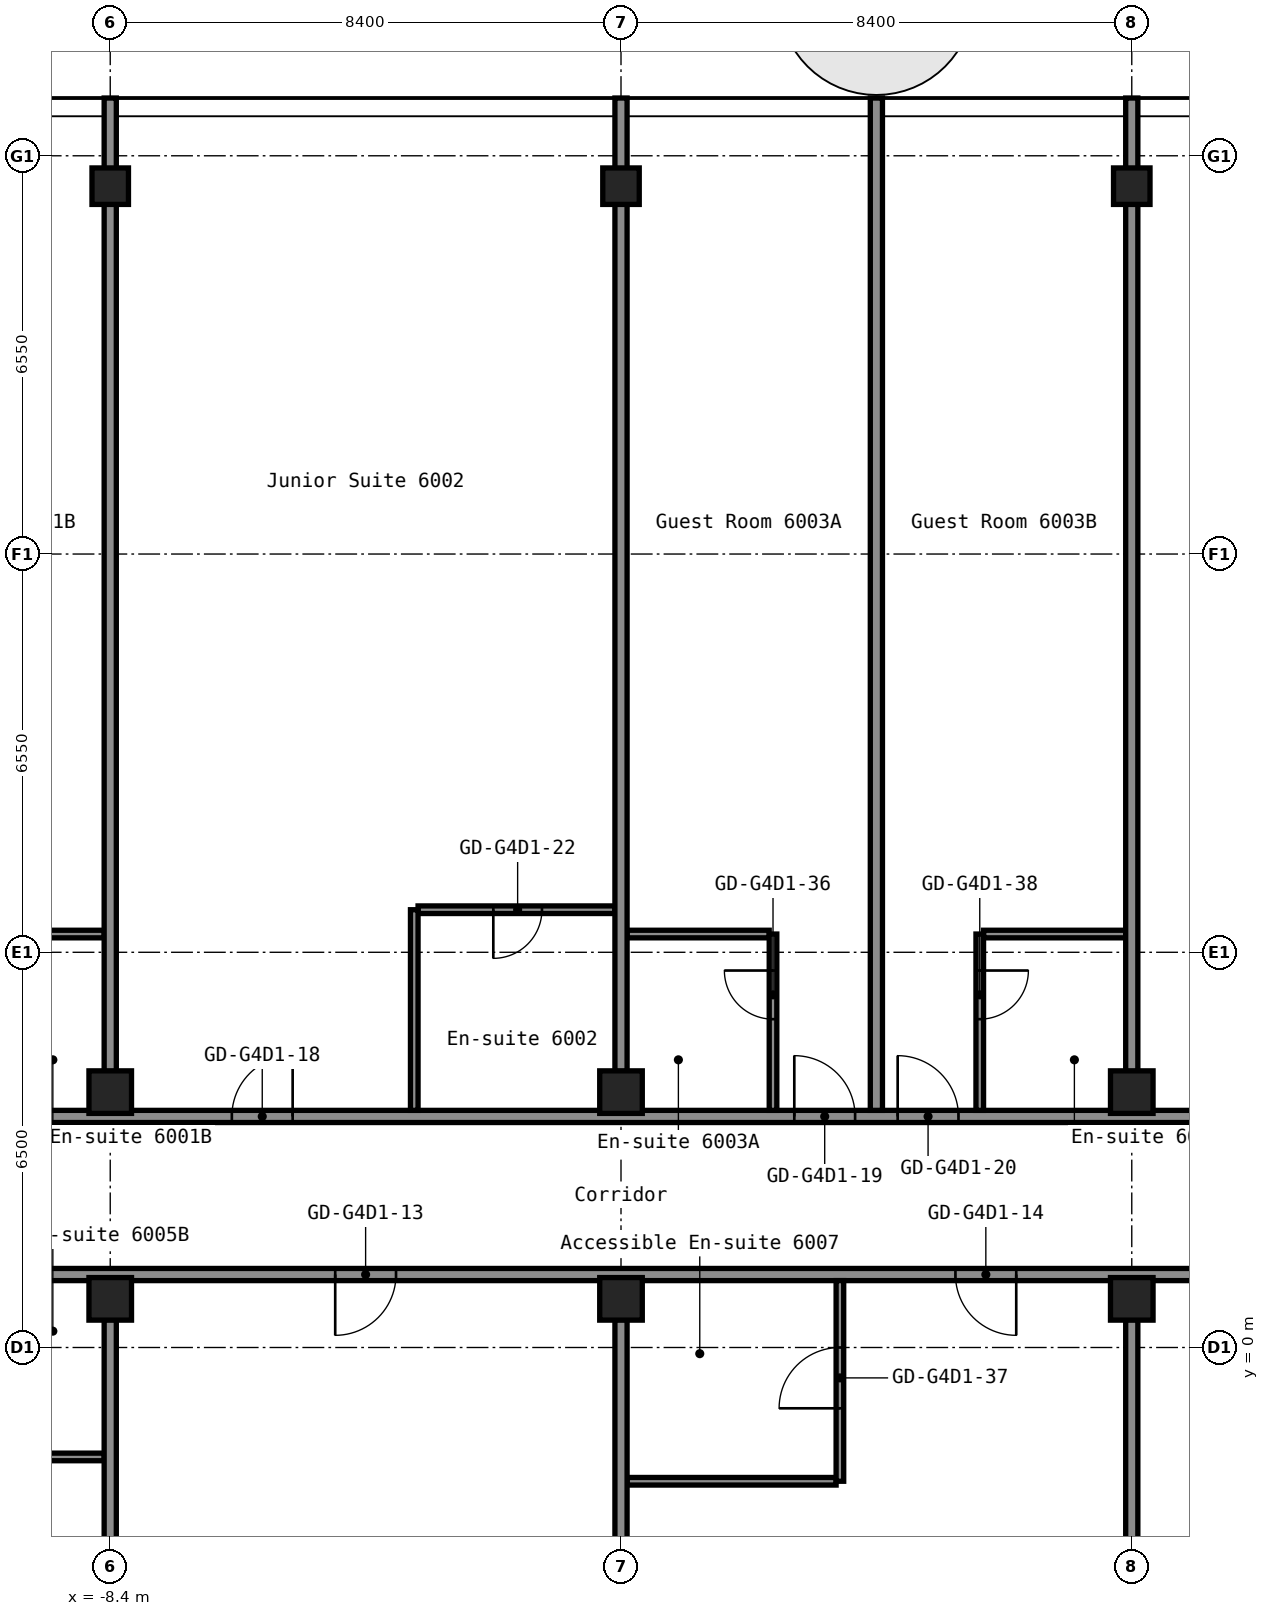
"""IFC4 building model, lengths in metres.
Left out: names, types, materials, properties, quantities, classifications, styles, units other than length and angle.
Written with IfcOpenShell. Run it as: python <this file> out.ifc"""

import sys

from ifc_helpers import new_model, si_unit, direction, frame, frame_2d, origin, origin_2d, place, context, subcontext, project, spatial, rectangle, hollow_rectangle, extrude, element, fill, save


model = new_model("IFC4")
c1 = context("Model", 3, precision=1e-05, world=origin(), true_north=direction((0.0, 1.0)))
c2 = subcontext(c1, "Body", "Model", "MODEL_VIEW")
j1 = project(units=[si_unit("LENGTHUNIT", "METRE"), si_unit("PLANEANGLEUNIT", "RADIAN")], contexts=[c1])
p1 = place(None, origin())
s1 = spatial("IfcSite", under=j1, at=p1, CompositionType="ELEMENT")
p2 = place(p1, origin())
s2 = spatial("IfcBuilding", under=s1, at=p2, CompositionType="ELEMENT")
p3 = place(p2, frame((0.0, 0.0, 212.2)))
s3 = spatial("IfcBuildingStorey", under=s2, at=p3, CompositionType="ELEMENT", Elevation=212.2)
for number, where, z_axis, x_axis in (
    (1, (-8.4, 0.8, 0.0), (0.0, 0.0, 1.0), (1.0, 0.0, 0.0)),
    (2, (-8.4, 4.2, 0.0), (0.0, 0.0, 1.0), (1.0, 0.0, 0.0)),
):
    element("IfcColumn", number, at=place(p3, frame(where, z_axis=z_axis, x_axis=x_axis)), inside=s3, PredefinedType="COLUMN", context=c2, shape_type="SweptSolid", body=[
        extrude(hollow_rectangle(XDim=0.7, YDim=0.7, WallThickness=0.028, at=origin_2d()), origin(), (0.0, 0.0, 1.0), 2.75),
    ])
p4 = place(p3, frame((-8.4, 19.1, 0.0), z_axis=(0.0, 0.0, 1.0), x_axis=(1.0, 0.0, 0.0)))
e3 = element("IfcColumn", 3, at=p4, inside=s3, PredefinedType="COLUMN", context=c2, shape_type="SweptSolid", body=[
    extrude(hollow_rectangle(XDim=0.6, YDim=0.6, WallThickness=0.025, InnerFilletRadius=0.038, OuterFilletRadius=0.062, at=origin_2d()), origin(), (0.0, 0.0, 1.0), 2.75),
])
for number, where, z_axis, x_axis in (
    (4, (0.0, 0.8, 0.0), (0.0, 0.0, 1.0), (1.0, 0.0, 0.0)),
    (5, (0.0, 4.2, 0.0), (0.0, 0.0, 1.0), (1.0, 0.0, 0.0)),
):
    element("IfcColumn", number, at=place(p3, frame(where, z_axis=z_axis, x_axis=x_axis)), inside=s3, PredefinedType="COLUMN", context=c2, shape_type="SweptSolid", body=[
        extrude(hollow_rectangle(XDim=0.7, YDim=0.7, WallThickness=0.028, at=origin_2d()), origin(), (0.0, 0.0, 1.0), 2.75),
    ])
p5 = place(p3, frame((0.0, 19.1, 0.0), z_axis=(0.0, 0.0, 1.0), x_axis=(1.0, 0.0, 0.0)))
e6 = element("IfcColumn", 6, at=p5, inside=s3, PredefinedType="COLUMN", context=c2, shape_type="SweptSolid", body=[
    extrude(hollow_rectangle(XDim=0.6, YDim=0.6, WallThickness=0.025, InnerFilletRadius=0.038, OuterFilletRadius=0.062, at=origin_2d()), origin(), (0.0, 0.0, 1.0), 2.75),
])
for number, where, z_axis, x_axis in (
    (7, (8.4, 0.8, 0.0), (0.0, 0.0, 1.0), (1.0, 0.0, 0.0)),
    (8, (8.4, 4.2, 0.0), (0.0, 0.0, 1.0), (1.0, 0.0, 0.0)),
):
    element("IfcColumn", number, at=place(p3, frame(where, z_axis=z_axis, x_axis=x_axis)), inside=s3, PredefinedType="COLUMN", context=c2, shape_type="SweptSolid", body=[
        extrude(hollow_rectangle(XDim=0.7, YDim=0.7, WallThickness=0.028, at=origin_2d()), origin(), (0.0, 0.0, 1.0), 2.75),
    ])
p6 = place(p3, frame((8.4, 19.1, 0.0), z_axis=(0.0, 0.0, 1.0), x_axis=(1.0, 0.0, 0.0)))
e9 = element("IfcColumn", 9, at=p6, inside=s3, PredefinedType="COLUMN", context=c2, shape_type="SweptSolid", body=[
    extrude(hollow_rectangle(XDim=0.6, YDim=0.6, WallThickness=0.025, InnerFilletRadius=0.038, OuterFilletRadius=0.062, at=origin_2d()), origin(), (0.0, 0.0, 1.0), 2.75),
])
p7 = place(p3, frame((0.1, -2.2, 0.0), z_axis=(0.0, 0.0, 1.0), x_axis=(1.0, 0.0, 0.0)))
e10 = element("IfcWall", 10, at=p7, inside=s3, PredefinedType="PARTITIONING", context=c2, shape_type="SweptSolid", body=[
    extrude(rectangle(XDim=3.438, YDim=0.125, at=frame_2d((1.719, 0.0))), origin(), (0.0, 0.0, 1.0), 2.75),
])
p8 = place(p3, frame((-10.837, -1.8, 0.0), z_axis=(0.0, 0.0, 1.0), x_axis=(1.0, 0.0, 0.0)))
e11 = element("IfcWall", 11, at=p8, inside=s3, PredefinedType="PARTITIONING", context=c2, shape_type="SweptSolid", body=[
    extrude(rectangle(XDim=2.337, YDim=0.125, at=frame_2d((1.169, 0.0))), origin(), (0.0, 0.0, 1.0), 2.75),
])
p9 = place(p3, frame((-16.8, 1.2, 0.0), z_axis=(0.0, 0.0, 1.0), x_axis=(1.0, 0.0, 0.0)))
e12 = element("IfcWall", 12, at=p9, inside=s3, PredefinedType="PARTITIONING", context=c2, shape_type="SweptSolid", body=[
    extrude(rectangle(XDim=33.6, YDim=0.2, at=frame_2d((16.8, 0.0))), origin(), (0.0, 0.0, 1.0), 2.75),
])
p10 = place(p9, frame((2.85, 0.0, 0.0)))
e13 = element("IfcOpeningElement", 13, at=p10, cuts=e12, PredefinedType="OPENING", context=c2, shape_type="SweptSolid", body=[
    extrude(rectangle(XDim=1.0, YDim=2.1, at=frame_2d((0.5, 1.05))), frame((0.0, 0.11, 0.0), z_axis=(0.0, -1.0, 0.0), x_axis=(1.0, 0.0, 0.0)), (0.0, 0.0, 1.0), 0.22),
])
p11 = place(p9, frame((4.55, 0.0, 0.0)))
e14 = element("IfcOpeningElement", 14, at=p11, cuts=e12, PredefinedType="OPENING", context=c2, shape_type="SweptSolid", body=[
    extrude(rectangle(XDim=1.0, YDim=2.1, at=frame_2d((0.5, 1.05))), frame((0.0, 0.11, 0.0), z_axis=(0.0, -1.0, 0.0), x_axis=(1.0, 0.0, 0.0)), (0.0, 0.0, 1.0), 0.22),
])
p12 = place(p9, frame((12.1, 0.0, 0.0)))
e15 = element("IfcOpeningElement", 15, at=p12, cuts=e12, PredefinedType="OPENING", context=c2, shape_type="SweptSolid", body=[
    extrude(rectangle(XDim=1.0, YDim=2.1, at=frame_2d((0.5, 1.05))), frame((0.0, 0.11, 0.0), z_axis=(0.0, -1.0, 0.0), x_axis=(1.0, 0.0, 0.0)), (0.0, 0.0, 1.0), 0.22),
])
p13 = place(p9, frame((22.3, 0.0, 0.0)))
e16 = element("IfcOpeningElement", 16, at=p13, cuts=e12, PredefinedType="OPENING", context=c2, shape_type="SweptSolid", body=[
    extrude(rectangle(XDim=1.0, YDim=2.1, at=frame_2d((0.5, 1.05))), frame((0.0, 0.11, 0.0), z_axis=(0.0, -1.0, 0.0), x_axis=(1.0, 0.0, 0.0)), (0.0, 0.0, 1.0), 0.22),
])
p14 = place(p9, frame((27.2, 0.0, 0.0)))
e17 = element("IfcOpeningElement", 17, at=p14, cuts=e12, PredefinedType="OPENING", context=c2, shape_type="SweptSolid", body=[
    extrude(rectangle(XDim=1.0, YDim=2.1, at=frame_2d((0.5, 1.05))), frame((0.0, 0.11, 0.0), z_axis=(0.0, -1.0, 0.0), x_axis=(1.0, 0.0, 0.0)), (0.0, 0.0, 1.0), 0.22),
])
p15 = place(p3, frame((-16.8, 3.8, 0.0), z_axis=(0.0, 0.0, 1.0), x_axis=(1.0, 0.0, 0.0)))
e18 = element("IfcWall", 18, at=p15, inside=s3, PredefinedType="PARTITIONING", context=c2, shape_type="SweptSolid", body=[
    extrude(rectangle(XDim=33.6, YDim=0.2, at=frame_2d((16.8, 0.0))), origin(), (0.0, 0.0, 1.0), 2.75),
])
p16 = place(p15, frame((2.85, 0.0, 0.0)))
e19 = element("IfcOpeningElement", 19, at=p16, cuts=e18, PredefinedType="OPENING", context=c2, shape_type="SweptSolid", body=[
    extrude(rectangle(XDim=1.0, YDim=2.1, at=frame_2d((0.5, 1.05))), frame((0.0, 0.11, 0.0), z_axis=(0.0, -1.0, 0.0), x_axis=(1.0, 0.0, 0.0)), (0.0, 0.0, 1.0), 0.22),
])
p17 = place(p15, frame((4.55, 0.0, 0.0)))
e20 = element("IfcOpeningElement", 20, at=p17, cuts=e18, PredefinedType="OPENING", context=c2, shape_type="SweptSolid", body=[
    extrude(rectangle(XDim=1.0, YDim=2.1, at=frame_2d((0.5, 1.05))), frame((0.0, 0.11, 0.0), z_axis=(0.0, -1.0, 0.0), x_axis=(1.0, 0.0, 0.0)), (0.0, 0.0, 1.0), 0.22),
])
p18 = place(p15, frame((10.4, 0.0, 0.0)))
e21 = element("IfcOpeningElement", 21, at=p18, cuts=e18, PredefinedType="OPENING", context=c2, shape_type="SweptSolid", body=[
    extrude(rectangle(XDim=1.0, YDim=2.1, at=frame_2d((0.5, 1.05))), frame((0.0, 0.11, 0.0), z_axis=(0.0, -1.0, 0.0), x_axis=(1.0, 0.0, 0.0)), (0.0, 0.0, 1.0), 0.22),
])
p19 = place(p15, frame((19.65, 0.0, 0.0)))
e22 = element("IfcOpeningElement", 22, at=p19, cuts=e18, PredefinedType="OPENING", context=c2, shape_type="SweptSolid", body=[
    extrude(rectangle(XDim=1.0, YDim=2.1, at=frame_2d((0.5, 1.05))), frame((0.0, 0.11, 0.0), z_axis=(0.0, -1.0, 0.0), x_axis=(1.0, 0.0, 0.0)), (0.0, 0.0, 1.0), 0.22),
])
p20 = place(p15, frame((21.35, 0.0, 0.0)))
e23 = element("IfcOpeningElement", 23, at=p20, cuts=e18, PredefinedType="OPENING", context=c2, shape_type="SweptSolid", body=[
    extrude(rectangle(XDim=1.0, YDim=2.1, at=frame_2d((0.5, 1.05))), frame((0.0, 0.11, 0.0), z_axis=(0.0, -1.0, 0.0), x_axis=(1.0, 0.0, 0.0)), (0.0, 0.0, 1.0), 0.22),
])
p21 = place(p15, frame((27.2, 0.0, 0.0)))
e24 = element("IfcOpeningElement", 24, at=p21, cuts=e18, PredefinedType="OPENING", context=c2, shape_type="SweptSolid", body=[
    extrude(rectangle(XDim=1.0, YDim=2.1, at=frame_2d((0.5, 1.05))), frame((0.0, 0.11, 0.0), z_axis=(0.0, -1.0, 0.0), x_axis=(1.0, 0.0, 0.0)), (0.0, 0.0, 1.0), 0.22),
])
for number, where, z_axis, x_axis in (
    (25, (-10.837, 6.8, 0.0), (0.0, 0.0, 1.0), (1.0, 0.0, 0.0)),
    (26, (0.1, 6.8, 0.0), (0.0, 0.0, 1.0), (1.0, 0.0, 0.0)),
):
    element("IfcWall", number, at=place(p3, frame(where, z_axis=z_axis, x_axis=x_axis)), inside=s3, PredefinedType="PARTITIONING", context=c2, shape_type="SweptSolid", body=[
        extrude(rectangle(XDim=2.337, YDim=0.125, at=frame_2d((1.169, 0.0))), origin(), (0.0, 0.0, 1.0), 2.75),
    ])
p22 = place(p3, frame((5.962, 6.8, 0.0), z_axis=(0.0, 0.0, 1.0), x_axis=(1.0, 0.0, 0.0)))
e27 = element("IfcWall", 27, at=p22, inside=s3, PredefinedType="PARTITIONING", context=c2, shape_type="SweptSolid", body=[
    extrude(rectangle(XDim=2.338, YDim=0.125, at=frame_2d((1.169, 0.0))), origin(), (0.0, 0.0, 1.0), 2.75),
])
p23 = place(p3, frame((-3.337, 7.2, 0.0), z_axis=(0.0, 0.0, 1.0), x_axis=(1.0, 0.0, 0.0)))
e28 = element("IfcWall", 28, at=p23, inside=s3, PredefinedType="PARTITIONING", context=c2, shape_type="SweptSolid", body=[
    extrude(rectangle(XDim=3.237, YDim=0.125, at=frame_2d((1.619, 0.0))), origin(), (0.0, 0.0, 1.0), 2.75),
])
p24 = place(p23, frame((1.238, 0.0, 0.0)))
e29 = element("IfcOpeningElement", 29, at=p24, cuts=e28, PredefinedType="OPENING", context=c2, shape_type="SweptSolid", body=[
    extrude(rectangle(XDim=0.8, YDim=2.1, at=frame_2d((0.4, 1.05))), frame((0.0, 0.073, 0.0), z_axis=(0.0, -1.0, 0.0), x_axis=(1.0, 0.0, 0.0)), (0.0, 0.0, 1.0), 0.145),
])
for number, where, z_axis, x_axis in (
    (30, (-8.4, -15.55, 0.0), (0.0, 0.0, 1.0), (0.0, 1.0, 0.0)),
    (31, (-8.4, 4.54, 0.0), (0.0, 0.0, 1.0), (0.0, 1.0, 0.0)),
):
    element("IfcWall", number, at=place(p3, frame(where, z_axis=z_axis, x_axis=x_axis)), inside=s3, PredefinedType="PARTITIONING", context=c2, shape_type="SweptSolid", body=[
        extrude(rectangle(XDim=16.01, YDim=0.2, at=frame_2d((8.005, 0.0))), origin(), (0.0, 0.0, 1.0), 2.75),
    ])
p25 = place(p3, frame((-3.4, 3.9, 0.0), z_axis=(0.0, 0.0, 1.0), x_axis=(0.0, 1.0, 0.0)))
e32 = element("IfcWall", 32, at=p25, inside=s3, PredefinedType="PARTITIONING", context=c2, shape_type="SweptSolid", body=[
    extrude(rectangle(XDim=3.3, YDim=0.125, at=frame_2d((1.65, 0.0))), origin(), (0.0, 0.0, 1.0), 2.75),
])
for number, where, z_axis, x_axis in (
    (33, (0.0, -15.55, 0.0), (0.0, 0.0, 1.0), (0.0, 1.0, 0.0)),
    (34, (0.0, 4.54, 0.0), (0.0, 0.0, 1.0), (0.0, 1.0, 0.0)),
):
    element("IfcWall", number, at=place(p3, frame(where, z_axis=z_axis, x_axis=x_axis)), inside=s3, PredefinedType="PARTITIONING", context=c2, shape_type="SweptSolid", body=[
        extrude(rectangle(XDim=16.01, YDim=0.2, at=frame_2d((8.005, 0.0))), origin(), (0.0, 0.0, 1.0), 2.75),
    ])
p26 = place(p3, frame((2.5, 3.9, 0.0), z_axis=(0.0, 0.0, 1.0), x_axis=(0.0, 1.0, 0.0)))
e35 = element("IfcWall", 35, at=p26, inside=s3, PredefinedType="PARTITIONING", context=c2, shape_type="SweptSolid", body=[
    extrude(rectangle(XDim=2.9, YDim=0.125, at=frame_2d((1.45, 0.0))), origin(), (0.0, 0.0, 1.0), 2.75),
])
p27 = place(p26, frame((1.5, 0.0, 0.0)))
e36 = element("IfcOpeningElement", 36, at=p27, cuts=e35, PredefinedType="OPENING", context=c2, shape_type="SweptSolid", body=[
    extrude(rectangle(XDim=0.8, YDim=2.1, at=frame_2d((0.4, 1.05))), frame((0.0, 0.073, 0.0), z_axis=(0.0, -1.0, 0.0), x_axis=(1.0, 0.0, 0.0)), (0.0, 0.0, 1.0), 0.145),
])
p28 = place(p3, frame((3.6, -2.2, 0.0), z_axis=(0.0, 0.0, 1.0), x_axis=(0.0, 1.0, 0.0)))
e37 = element("IfcWall", 37, at=p28, inside=s3, PredefinedType="PARTITIONING", context=c2, shape_type="SweptSolid", body=[
    extrude(rectangle(XDim=3.3, YDim=0.125, at=frame_2d((1.65, 0.0))), origin(), (0.0, 0.0, 1.0), 2.75),
])
p29 = place(p28, frame((1.2, 0.0, 0.0)))
e38 = element("IfcOpeningElement", 38, at=p29, cuts=e37, PredefinedType="OPENING", context=c2, shape_type="SweptSolid", body=[
    extrude(rectangle(XDim=1.0, YDim=2.1, at=frame_2d((0.5, 1.05))), frame((0.0, 0.073, 0.0), z_axis=(0.0, -1.0, 0.0), x_axis=(1.0, 0.0, 0.0)), (0.0, 0.0, 1.0), 0.145),
])
p30 = place(p3, frame((4.2, 3.9, 0.0), z_axis=(0.0, 0.0, 1.0), x_axis=(0.0, 1.0, 0.0)))
e39 = element("IfcWall", 39, at=p30, inside=s3, PredefinedType="PARTITIONING", context=c2, shape_type="SweptSolid", body=[
    extrude(rectangle(XDim=16.65, YDim=0.2, at=frame_2d((8.325, 0.0))), origin(), (0.0, 0.0, 1.0), 2.75),
])
p31 = place(p3, frame((5.9, 3.9, 0.0), z_axis=(0.0, 0.0, 1.0), x_axis=(0.0, 1.0, 0.0)))
e40 = element("IfcWall", 40, at=p31, inside=s3, PredefinedType="PARTITIONING", context=c2, shape_type="SweptSolid", body=[
    extrude(rectangle(XDim=2.9, YDim=0.125, at=frame_2d((1.45, 0.0))), origin(), (0.0, 0.0, 1.0), 2.75),
])
p32 = place(p31, frame((1.5, 0.0, 0.0)))
e41 = element("IfcOpeningElement", 41, at=p32, cuts=e40, PredefinedType="OPENING", context=c2, shape_type="SweptSolid", body=[
    extrude(rectangle(XDim=0.8, YDim=2.1, at=frame_2d((0.4, 1.05))), frame((0.0, 0.073, 0.0), z_axis=(0.0, -1.0, 0.0), x_axis=(1.0, 0.0, 0.0)), (0.0, 0.0, 1.0), 0.145),
])
for number, where, z_axis, x_axis in (
    (42, (8.4, -15.55, 0.0), (0.0, 0.0, 1.0), (0.0, 1.0, 0.0)),
    (43, (8.4, 4.54, 0.0), (0.0, 0.0, 1.0), (0.0, 1.0, 0.0)),
):
    element("IfcWall", number, at=place(p3, frame(where, z_axis=z_axis, x_axis=x_axis)), inside=s3, PredefinedType="PARTITIONING", context=c2, shape_type="SweptSolid", body=[
        extrude(rectangle(XDim=16.01, YDim=0.2, at=frame_2d((8.005, 0.0))), origin(), (0.0, 0.0, 1.0), 2.75),
    ])
p33 = place(p12, origin())
e44 = element("IfcDoor", 44, at=p33, inside=s3, OperationType="SINGLE_SWING_LEFT", PredefinedType="DOOR", context=c2, shape_type="SweptSolid", body=[
    extrude(rectangle(XDim=1.0, YDim=2.1, at=frame_2d((0.5, 1.05))), frame((0.0, 0.025, 0.0), z_axis=(0.0, -1.0, 0.0), x_axis=(1.0, 0.0, 0.0)), (0.0, 0.0, 1.0), 0.05),
])
fill(e15, e44)
p34 = place(p13, origin())
e45 = element("IfcDoor", 45, at=p34, inside=s3, OperationType="SINGLE_SWING_RIGHT", PredefinedType="DOOR", context=c2, shape_type="SweptSolid", body=[
    extrude(rectangle(XDim=1.0, YDim=2.1, at=frame_2d((0.5, 1.05))), frame((0.0, 0.025, 0.0), z_axis=(0.0, -1.0, 0.0), x_axis=(1.0, 0.0, 0.0)), (0.0, 0.0, 1.0), 0.05),
])
fill(e16, e45)
p35 = place(p18, origin())
e46 = element("IfcDoor", 46, at=p35, inside=s3, OperationType="SINGLE_SWING_LEFT", PredefinedType="DOOR", context=c2, shape_type="SweptSolid", body=[
    extrude(rectangle(XDim=1.0, YDim=2.1, at=frame_2d((0.5, 1.05))), frame((0.0, 0.025, 0.0), z_axis=(0.0, -1.0, 0.0), x_axis=(1.0, 0.0, 0.0)), (0.0, 0.0, 1.0), 0.05),
])
fill(e21, e46)
p36 = place(p19, origin())
e47 = element("IfcDoor", 47, at=p36, inside=s3, OperationType="SINGLE_SWING_RIGHT", PredefinedType="DOOR", context=c2, shape_type="SweptSolid", body=[
    extrude(rectangle(XDim=1.0, YDim=2.1, at=frame_2d((0.5, 1.05))), frame((0.0, 0.025, 0.0), z_axis=(0.0, -1.0, 0.0), x_axis=(1.0, 0.0, 0.0)), (0.0, 0.0, 1.0), 0.05),
])
fill(e22, e47)
p37 = place(p20, origin())
e48 = element("IfcDoor", 48, at=p37, inside=s3, OperationType="SINGLE_SWING_RIGHT", PredefinedType="DOOR", context=c2, shape_type="SweptSolid", body=[
    extrude(rectangle(XDim=1.0, YDim=2.1, at=frame_2d((0.5, 1.05))), frame((0.0, 0.025, 0.0), z_axis=(0.0, -1.0, 0.0), x_axis=(1.0, 0.0, 0.0)), (0.0, 0.0, 1.0), 0.05),
])
fill(e23, e48)
p38 = place(p24, origin())
e49 = element("IfcDoor", 49, at=p38, inside=s3, OperationType="SINGLE_SWING_LEFT", PredefinedType="DOOR", context=c2, shape_type="SweptSolid", body=[
    extrude(rectangle(XDim=0.8, YDim=2.1, at=frame_2d((0.4, 1.05))), frame((0.0, 0.025, 0.0), z_axis=(0.0, -1.0, 0.0), x_axis=(1.0, 0.0, 0.0)), (0.0, 0.0, 1.0), 0.05),
])
fill(e29, e49)
p39 = place(p27, origin())
e50 = element("IfcDoor", 50, at=p39, inside=s3, OperationType="SINGLE_SWING_LEFT", PredefinedType="DOOR", context=c2, shape_type="SweptSolid", body=[
    extrude(rectangle(XDim=0.8, YDim=2.1, at=frame_2d((0.4, 1.05))), frame((0.0, 0.025, 0.0), z_axis=(0.0, -1.0, 0.0), x_axis=(1.0, 0.0, 0.0)), (0.0, 0.0, 1.0), 0.05),
])
fill(e36, e50)
p40 = place(p29, origin())
e51 = element("IfcDoor", 51, at=p40, inside=s3, OperationType="SINGLE_SWING_RIGHT", PredefinedType="DOOR", context=c2, shape_type="SweptSolid", body=[
    extrude(rectangle(XDim=1.0, YDim=2.1, at=frame_2d((0.5, 1.05))), frame((0.0, 0.025, 0.0), z_axis=(0.0, -1.0, 0.0), x_axis=(1.0, 0.0, 0.0)), (0.0, 0.0, 1.0), 0.05),
])
fill(e38, e51)
p41 = place(p32, origin())
e52 = element("IfcDoor", 52, at=p41, inside=s3, OperationType="SINGLE_SWING_RIGHT", PredefinedType="DOOR", context=c2, shape_type="SweptSolid", body=[
    extrude(rectangle(XDim=0.8, YDim=2.1, at=frame_2d((0.4, 1.05))), frame((0.0, 0.025, 0.0), z_axis=(0.0, -1.0, 0.0), x_axis=(1.0, 0.0, 0.0)), (0.0, 0.0, 1.0), 0.05),
])
fill(e41, e52)
save(model, sys.argv[1])
